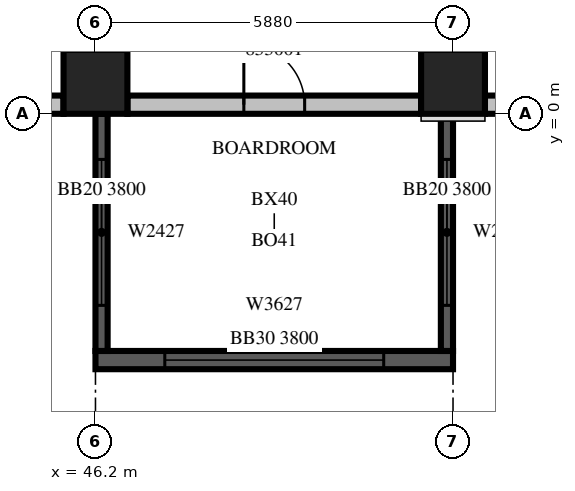
"""IFC4 building model, lengths in metres.
Left out: names, types, materials, properties, quantities, classifications, styles, units other than length and angle.
Written with IfcOpenShell. Run it as: python <this file> out.ifc"""

import sys

from ifc_helpers import new_model, si_unit, direction, frame, frame_2d, origin, origin_2d, place, context, subcontext, project, spatial, rectangle, extrude, source, transform, mapped, element, fill, save


model = new_model("IFC4")
c1 = context("Model", 3, precision=1e-05, world=origin(), true_north=direction((0.0, 1.0)))
c2 = subcontext(c1, "Body", "Model", "MODEL_VIEW")
j1 = project(units=[si_unit("LENGTHUNIT", "METRE"), si_unit("PLANEANGLEUNIT", "RADIAN")], contexts=[c1])
p1 = place(None, origin())
s1 = spatial("IfcSite", under=j1, at=p1, CompositionType="ELEMENT")
p2 = place(p1, origin())
s2 = spatial("IfcBuilding", under=s1, at=p2, CompositionType="ELEMENT")
p3 = place(p2, frame((0.0, 0.0, 149.7)))
s3 = spatial("IfcBuildingStorey", under=s2, at=p3, CompositionType="ELEMENT", Elevation=149.7)
m1 = source(origin(), c2, "Body", "SweptSolid", [
    extrude(rectangle(XDim=1.05, YDim=1.05, at=origin_2d()), origin(), (0.0, 0.0, 1.0), 4.2),
])
for number, where, z_axis, x_axis in (
    (1, (46.2, 0.525, 0.0), (0.0, 0.0, 1.0), (1.0, 0.0, 0.0)),
    (2, (52.08, 0.525, 0.0), (0.0, 0.0, 1.0), (1.0, 0.0, 0.0)),
):
    element("IfcColumn", number, at=place(p3, frame(where, z_axis=z_axis, x_axis=x_axis)), inside=s3, PredefinedType="COLUMN", context=c2, shape_type="MappedRepresentation", body=[
        mapped(m1, transform((0.0, 0.0, 0.0), scale=1.0)),
    ])
m2 = source(origin(), c2, "Body", "SweptSolid", [
    extrude(rectangle(XDim=5.88, YDim=0.3, at=frame_2d((2.94, 0.0))), origin(), (0.0, 0.0, 1.0), 3.8),
])
p4 = place(p3, frame((46.2, -4.05, 0.0), z_axis=(0.0, 0.0, 1.0), x_axis=(1.0, 0.0, 0.0)))
e3 = element("IfcWall", 3, at=p4, inside=s3, PredefinedType="SOLIDWALL", context=c2, shape_type="MappedRepresentation", body=[
    mapped(m2, transform((0.0, 0.0, 0.0), scale=1.0)),
])
m3 = source(origin(), c2, "Body", "SweptSolid", [
    extrude(rectangle(XDim=3.6, YDim=2.7, at=frame_2d((1.8, 1.35))), frame((0.0, 0.16, 0.0), z_axis=(0.0, -1.0, 0.0), x_axis=(1.0, 0.0, 0.0)), (0.0, 0.0, 1.0), 0.32),
])
p5 = place(p4, frame((1.14, 0.0, 0.6)))
e4 = element("IfcOpeningElement", 4, at=p5, cuts=e3, PredefinedType="OPENING", context=c2, shape_type="MappedRepresentation", body=[
    mapped(m3, transform((0.0, 0.0, 0.0), scale=1.0)),
])
m4 = source(origin(), c2, "Body", "SweptSolid", [
    extrude(rectangle(XDim=3.9, YDim=0.2, at=frame_2d((1.95, 0.0))), origin(), (0.0, 0.0, 1.0), 3.8),
])
p6 = place(p3, frame((46.3, 0.0, 0.0), z_axis=(0.0, 0.0, 1.0), x_axis=(0.0, -1.0, 0.0)))
e5 = element("IfcWall", 5, at=p6, inside=s3, PredefinedType="SOLIDWALL", context=c2, shape_type="MappedRepresentation", body=[
    mapped(m4, transform((0.0, 0.0, 0.0), scale=1.0)),
])
m5 = source(origin(), c2, "Body", "SweptSolid", [
    extrude(rectangle(XDim=2.4, YDim=2.7, at=frame_2d((1.2, 1.35))), frame((0.0, 0.11, 0.0), z_axis=(0.0, -1.0, 0.0), x_axis=(1.0, 0.0, 0.0)), (0.0, 0.0, 1.0), 0.22),
])
p7 = place(p6, frame((0.75, 0.0, 0.6)))
e6 = element("IfcOpeningElement", 6, at=p7, cuts=e5, PredefinedType="OPENING", context=c2, shape_type="MappedRepresentation", body=[
    mapped(m5, transform((0.0, 0.0, 0.0), scale=1.0)),
])
p8 = place(p3, frame((51.98, 0.0, 0.0), z_axis=(0.0, 0.0, 1.0), x_axis=(0.0, -1.0, 0.0)))
e7 = element("IfcWall", 7, at=p8, inside=s3, PredefinedType="SOLIDWALL", context=c2, shape_type="MappedRepresentation", body=[
    mapped(m4, transform((0.0, 0.0, 0.0), scale=1.0)),
])
p9 = place(p8, frame((0.75, 0.0, 0.6)))
e8 = element("IfcOpeningElement", 8, at=p9, cuts=e7, PredefinedType="OPENING", context=c2, shape_type="MappedRepresentation", body=[
    mapped(m5, transform((0.0, 0.0, 0.0), scale=1.0)),
])
m6 = source(origin(), c2, "Body", "SweptSolid", [
    extrude(rectangle(XDim=1.675, YDim=0.3, at=frame_2d((0.838, 0.0))), origin(), (0.0, 0.0, 1.0), 3.8),
])
p10 = place(p3, frame((44.0, 0.15, 0.0), z_axis=(0.0, 0.0, 1.0), x_axis=(1.0, 0.0, 0.0)))
e9 = element("IfcWall", 9, at=p10, inside=s3, PredefinedType="STANDARD", context=c2, shape_type="MappedRepresentation", body=[
    mapped(m6, transform((0.0, 0.0, 0.0), scale=1.0)),
])
m7 = source(origin(), c2, "Body", "SweptSolid", [
    extrude(rectangle(XDim=0.9, YDim=2.7, at=frame_2d((0.45, 1.35))), frame((0.0, 0.16, 0.0), z_axis=(0.0, -1.0, 0.0), x_axis=(1.0, 0.0, 0.0)), (0.0, 0.0, 1.0), 0.32),
])
p11 = place(p10, frame((0.388, 0.0, 0.6)))
e10 = element("IfcOpeningElement", 10, at=p11, cuts=e9, PredefinedType="OPENING", context=c2, shape_type="MappedRepresentation", body=[
    mapped(m7, transform((0.0, 0.0, 0.0), scale=1.0)),
])
m8 = source(origin(), c2, "Body", "SweptSolid", [
    extrude(rectangle(XDim=4.83, YDim=0.3, at=frame_2d((2.415, 0.0))), origin(), (0.0, 0.0, 1.0), 3.8),
])
p12 = place(p3, frame((46.725, 0.15, 0.0), z_axis=(0.0, 0.0, 1.0), x_axis=(1.0, 0.0, 0.0)))
e11 = element("IfcWall", 11, at=p12, inside=s3, PredefinedType="STANDARD", context=c2, shape_type="MappedRepresentation", body=[
    mapped(m8, transform((0.0, 0.0, 0.0), scale=1.0)),
])
m9 = source(origin(), c2, "Body", "SweptSolid", [
    extrude(rectangle(XDim=1.0, YDim=2.1, at=frame_2d((0.5, 1.05))), frame((0.0, 0.16, 0.0), z_axis=(0.0, -1.0, 0.0), x_axis=(1.0, 0.0, 0.0)), (0.0, 0.0, 1.0), 0.32),
])
p13 = place(p12, frame((1.915, 0.0, 0.0)))
e12 = element("IfcOpeningElement", 12, at=p13, cuts=e11, PredefinedType="OPENING", context=c2, shape_type="MappedRepresentation", body=[
    mapped(m9, transform((0.0, 0.0, 0.0), scale=1.0)),
])
p14 = place(p3, frame((52.605, 0.15, 0.0), z_axis=(0.0, 0.0, 1.0), x_axis=(1.0, 0.0, 0.0)))
e13 = element("IfcWall", 13, at=p14, inside=s3, PredefinedType="STANDARD", context=c2, shape_type="MappedRepresentation", body=[
    mapped(m8, transform((0.0, 0.0, 0.0), scale=1.0)),
])
p15 = place(p14, frame((0.615, 0.0, 0.6)))
e14 = element("IfcOpeningElement", 14, at=p15, cuts=e13, PredefinedType="OPENING", context=c2, shape_type="MappedRepresentation", body=[
    mapped(m3, transform((0.0, 0.0, 0.0), scale=1.0)),
])
m10 = source(origin(), c2, "Body", "SweptSolid", [
    extrude(rectangle(XDim=3.6, YDim=2.7, at=frame_2d((1.8, 1.35))), frame((0.0, 0.03, 0.0), z_axis=(0.0, -1.0, 0.0), x_axis=(1.0, 0.0, 0.0)), (0.0, 0.0, 1.0), 0.06),
])
p16 = place(p5, origin())
e15 = element("IfcWindow", 15, at=p16, inside=s3, PartitioningType="SINGLE_PANEL", PredefinedType="WINDOW", context=c2, shape_type="MappedRepresentation", body=[
    mapped(m10, transform((0.0, 0.0, 0.0), scale=1.0)),
])
fill(e4, e15)
m11 = source(origin(), c2, "Body", "SweptSolid", [
    extrude(rectangle(XDim=2.4, YDim=2.7, at=frame_2d((1.2, 1.35))), frame((0.0, 0.03, 0.0), z_axis=(0.0, -1.0, 0.0), x_axis=(1.0, 0.0, 0.0)), (0.0, 0.0, 1.0), 0.06),
])
p17 = place(p7, origin())
e16 = element("IfcWindow", 16, at=p17, inside=s3, PartitioningType="SINGLE_PANEL", PredefinedType="WINDOW", context=c2, shape_type="MappedRepresentation", body=[
    mapped(m11, transform((0.0, 0.0, 0.0), scale=1.0)),
])
fill(e6, e16)
p18 = place(p9, origin())
e17 = element("IfcWindow", 17, at=p18, inside=s3, PartitioningType="SINGLE_PANEL", PredefinedType="WINDOW", context=c2, shape_type="MappedRepresentation", body=[
    mapped(m11, transform((0.0, 0.0, 0.0), scale=1.0)),
])
fill(e8, e17)
m12 = source(origin(), c2, "Body", "SweptSolid", [
    extrude(rectangle(XDim=1.0, YDim=2.1, at=frame_2d((0.5, 1.05))), frame((0.0, 0.025, 0.0), z_axis=(0.0, -1.0, 0.0), x_axis=(1.0, 0.0, 0.0)), (0.0, 0.0, 1.0), 0.05),
])
p19 = place(p13, origin())
e18 = element("IfcDoor", 18, at=p19, inside=s3, OperationType="SINGLE_SWING_LEFT", PredefinedType="DOOR", context=c2, shape_type="MappedRepresentation", body=[
    mapped(m12, transform((0.0, 0.0, 0.0), scale=1.0)),
])
fill(e12, e18)
save(model, sys.argv[1])
